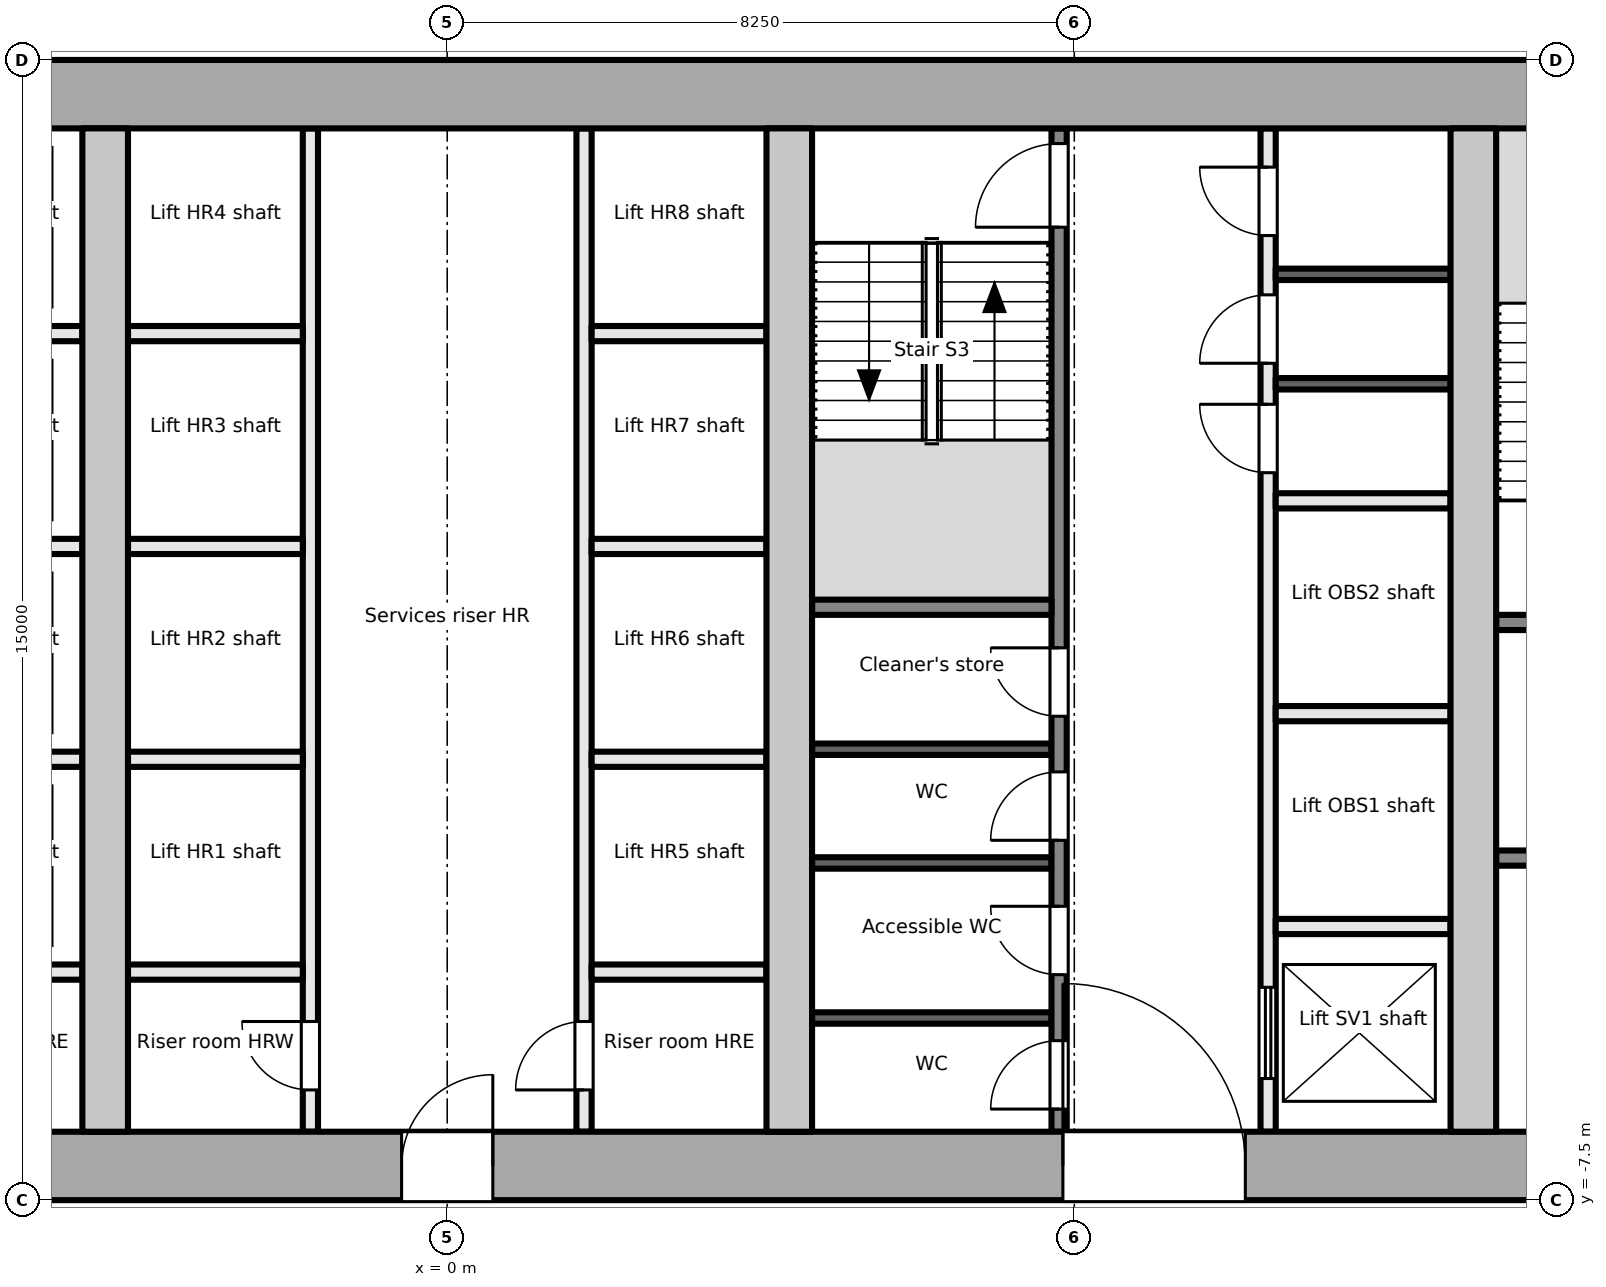
"""IFC4 building model, lengths in metres.
Left out: names, types, materials, properties, quantities, classifications, styles, units other than length and angle.
Written with IfcOpenShell. Run it as: python <this file> out.ifc"""

import sys

from ifc_helpers import new_model, si_unit, direction, frame, frame_2d, origin, place, context, subcontext, project, spatial, rectangle, extrude, element, fill, save


model = new_model("IFC4")
c1 = context("Model", 3, precision=1e-05, world=origin(), true_north=direction((0.0, 1.0)))
c2 = subcontext(c1, "Body", "Model", "MODEL_VIEW")
j1 = project(units=[si_unit("LENGTHUNIT", "METRE"), si_unit("PLANEANGLEUNIT", "RADIAN")], contexts=[c1])
p1 = place(None, origin())
s1 = spatial("IfcSite", under=j1, at=p1, CompositionType="ELEMENT")
p2 = place(p1, origin())
s2 = spatial("IfcBuilding", under=s1, at=p2, CompositionType="ELEMENT")
p3 = place(p2, frame((0.0, 0.0, 91.7)))
s3 = spatial("IfcBuildingStorey", under=s2, at=p3, CompositionType="ELEMENT", Elevation=91.7)
p4 = place(p3, frame((-18.0, -7.05, -0.2), z_axis=(0.0, 0.0, 1.0), x_axis=(1.0, 0.0, 0.0)))
e1 = element("IfcWall", 1, at=p4, inside=s3, PredefinedType="SHEAR", context=c2, shape_type="SweptSolid", body=[
    extrude(rectangle(XDim=36.0, YDim=0.9, at=frame_2d((18.0, 0.0))), origin(), (0.0, 0.0, 1.0), 4.0),
])
p5 = place(p4, frame((7.8, 0.0, 0.2)))
e2 = element("IfcOpeningElement", 2, at=p5, cuts=e1, PredefinedType="OPENING", context=c2, shape_type="SweptSolid", body=[
    extrude(rectangle(XDim=2.4, YDim=2.1, at=frame_2d((1.2, 1.05))), frame((0.0, 0.46, 0.0), z_axis=(0.0, -1.0, 0.0), x_axis=(1.0, 0.0, 0.0)), (0.0, 0.0, 1.0), 0.921),
])
p6 = place(p4, frame((17.4, 0.0, 0.2)))
e3 = element("IfcOpeningElement", 3, at=p6, cuts=e1, PredefinedType="OPENING", context=c2, shape_type="SweptSolid", body=[
    extrude(rectangle(XDim=1.2, YDim=2.1, at=frame_2d((0.6, 1.05))), frame((0.0, 0.46, 0.0), z_axis=(0.0, -1.0, 0.0), x_axis=(1.0, 0.0, 0.0)), (0.0, 0.0, 1.0), 0.921),
])
p7 = place(p4, frame((26.1, 0.0, 0.2)))
e4 = element("IfcOpeningElement", 4, at=p7, cuts=e1, PredefinedType="OPENING", context=c2, shape_type="SweptSolid", body=[
    extrude(rectangle(XDim=2.4, YDim=2.1, at=frame_2d((1.2, 1.05))), frame((0.0, 0.46, 0.0), z_axis=(0.0, -1.0, 0.0), x_axis=(1.0, 0.0, 0.0)), (0.0, 0.0, 1.0), 0.921),
])
p8 = place(p3, frame((-18.0, 7.05, -0.2), z_axis=(0.0, 0.0, 1.0), x_axis=(1.0, 0.0, 0.0)))
e5 = element("IfcWall", 5, at=p8, inside=s3, PredefinedType="SHEAR", context=c2, shape_type="SweptSolid", body=[
    extrude(rectangle(XDim=36.0, YDim=0.9, at=frame_2d((18.0, 0.0))), origin(), (0.0, 0.0, 1.0), 4.0),
])
for number, where, z_axis, x_axis in (
    (6, (-4.5, -6.6, -0.2), (0.0, 0.0, 1.0), (0.0, 1.0, 0.0)),
    (7, (4.5, -6.6, -0.2), (0.0, 0.0, 1.0), (0.0, 1.0, 0.0)),
    (8, (13.5, -6.6, -0.2), (0.0, 0.0, 1.0), (0.0, 1.0, 0.0)),
):
    element("IfcWall", number, at=place(p3, frame(where, z_axis=z_axis, x_axis=x_axis)), inside=s3, PredefinedType="SHEAR", context=c2, shape_type="SweptSolid", body=[
        extrude(rectangle(XDim=13.2, YDim=0.6, at=frame_2d((6.6, 0.0))), origin(), (0.0, 0.0, 1.0), 4.0),
    ])
p9 = place(p3, frame((13.8, -3.0, 0.0), z_axis=(0.0, 0.0, 1.0), x_axis=(1.0, 0.0, 0.0)))
e9 = element("IfcWall", 9, at=p9, inside=s3, PredefinedType="PARTITIONING", context=c2, shape_type="SweptSolid", body=[
    extrude(rectangle(XDim=3.3, YDim=0.2, at=frame_2d((1.65, 0.0))), origin(), (0.0, 0.0, 1.0), 3.8),
])
p10 = place(p9, frame((1.1, 0.0, 0.0)))
e10 = element("IfcOpeningElement", 10, at=p10, cuts=e9, PredefinedType="OPENING", context=c2, shape_type="SweptSolid", body=[
    extrude(rectangle(XDim=1.1, YDim=2.1, at=frame_2d((0.55, 1.05))), frame((0.0, 0.111, 0.0), z_axis=(0.0, -1.0, 0.0), x_axis=(1.0, 0.0, 0.0)), (0.0, 0.0, 1.0), 0.221),
])
p11 = place(p3, frame((13.8, 0.1, 0.0), z_axis=(0.0, 0.0, 1.0), x_axis=(1.0, 0.0, 0.0)))
e11 = element("IfcWall", 11, at=p11, inside=s3, PredefinedType="PARTITIONING", context=c2, shape_type="SweptSolid", body=[
    extrude(rectangle(XDim=3.3, YDim=0.2, at=frame_2d((1.65, 0.0))), origin(), (0.0, 0.0, 1.0), 3.8),
])
p12 = place(p11, frame((1.1, 0.0, 0.0)))
e12 = element("IfcOpeningElement", 12, at=p12, cuts=e11, PredefinedType="OPENING", context=c2, shape_type="SweptSolid", body=[
    extrude(rectangle(XDim=1.1, YDim=2.1, at=frame_2d((0.55, 1.05))), frame((0.0, 0.111, 0.0), z_axis=(0.0, -1.0, 0.0), x_axis=(1.0, 0.0, 0.0)), (0.0, 0.0, 1.0), 0.221),
])
for number, where, z_axis, x_axis in (
    (13, (-7.1, -1.7, 0.0), (0.0, 0.0, 1.0), (1.0, 0.0, 0.0)),
    (14, (-7.1, 1.1, 0.0), (0.0, 0.0, 1.0), (1.0, 0.0, 0.0)),
    (15, (-7.1, 3.9, 0.0), (0.0, 0.0, 1.0), (1.0, 0.0, 0.0)),
    (16, (-7.1, -4.5, 0.0), (0.0, 0.0, 1.0), (1.0, 0.0, 0.0)),
):
    element("IfcWall", number, at=place(p3, frame(where, z_axis=z_axis, x_axis=x_axis)), inside=s3, PredefinedType="PARTITIONING", context=c2, shape_type="SweptSolid", body=[
        extrude(rectangle(XDim=2.3, YDim=0.2, at=frame_2d((1.15, 0.0))), origin(), (0.0, 0.0, 1.0), 3.8),
    ])
p13 = place(p3, frame((-1.8, -6.6, 0.0), z_axis=(0.0, 0.0, 1.0), x_axis=(0.0, 1.0, 0.0)))
e17 = element("IfcWall", 17, at=p13, inside=s3, PredefinedType="PARTITIONING", context=c2, shape_type="SweptSolid", body=[
    extrude(rectangle(XDim=13.2, YDim=0.2, at=frame_2d((6.6, 0.0))), origin(), (0.0, 0.0, 1.0), 3.8),
])
p14 = place(p13, frame((0.55, 0.0, 0.0)))
e18 = element("IfcOpeningElement", 18, at=p14, cuts=e17, PredefinedType="OPENING", context=c2, shape_type="SweptSolid", body=[
    extrude(rectangle(XDim=0.9, YDim=2.1, at=frame_2d((0.45, 1.05))), frame((0.0, 0.111, 0.0), z_axis=(0.0, -1.0, 0.0), x_axis=(1.0, 0.0, 0.0)), (0.0, 0.0, 1.0), 0.221),
])
p15 = place(p3, frame((1.8, -6.6, 0.0), z_axis=(0.0, 0.0, 1.0), x_axis=(0.0, 1.0, 0.0)))
e19 = element("IfcWall", 19, at=p15, inside=s3, PredefinedType="PARTITIONING", context=c2, shape_type="SweptSolid", body=[
    extrude(rectangle(XDim=13.2, YDim=0.2, at=frame_2d((6.6, 0.0))), origin(), (0.0, 0.0, 1.0), 3.8),
])
p16 = place(p15, frame((0.55, 0.0, 0.0)))
e20 = element("IfcOpeningElement", 20, at=p16, cuts=e19, PredefinedType="OPENING", context=c2, shape_type="SweptSolid", body=[
    extrude(rectangle(XDim=0.9, YDim=2.1, at=frame_2d((0.45, 1.05))), frame((0.0, 0.111, 0.0), z_axis=(0.0, -1.0, 0.0), x_axis=(1.0, 0.0, 0.0)), (0.0, 0.0, 1.0), 0.221),
])
for number, where, z_axis, x_axis in (
    (21, (-4.2, -1.7, 0.0), (0.0, 0.0, 1.0), (1.0, 0.0, 0.0)),
    (22, (-4.2, 1.1, 0.0), (0.0, 0.0, 1.0), (1.0, 0.0, 0.0)),
    (23, (-4.2, 3.9, 0.0), (0.0, 0.0, 1.0), (1.0, 0.0, 0.0)),
    (24, (-4.2, -4.5, 0.0), (0.0, 0.0, 1.0), (1.0, 0.0, 0.0)),
    (25, (1.9, -1.7, 0.0), (0.0, 0.0, 1.0), (1.0, 0.0, 0.0)),
    (26, (1.9, 1.1, 0.0), (0.0, 0.0, 1.0), (1.0, 0.0, 0.0)),
    (27, (1.9, 3.9, 0.0), (0.0, 0.0, 1.0), (1.0, 0.0, 0.0)),
    (28, (1.9, -4.5, 0.0), (0.0, 0.0, 1.0), (1.0, 0.0, 0.0)),
):
    element("IfcWall", number, at=place(p3, frame(where, z_axis=z_axis, x_axis=x_axis)), inside=s3, PredefinedType="PARTITIONING", context=c2, shape_type="SweptSolid", body=[
        extrude(rectangle(XDim=2.3, YDim=0.2, at=frame_2d((1.15, 0.0))), origin(), (0.0, 0.0, 1.0), 3.8),
    ])
p17 = place(p3, frame((8.05, -6.6, 0.0), z_axis=(0.0, 0.0, 1.0), x_axis=(0.0, 1.0, 0.0)))
e29 = element("IfcWall", 29, at=p17, inside=s3, PredefinedType="PARTITIONING", context=c2, shape_type="SweptSolid", body=[
    extrude(rectangle(XDim=13.2, YDim=0.2, at=frame_2d((6.6, 0.0))), origin(), (0.0, 0.0, 1.0), 3.8),
])
p18 = place(p17, frame((0.298, 0.0, 0.0)))
e30 = element("IfcOpeningElement", 30, at=p18, cuts=e29, PredefinedType="OPENING", context=c2, shape_type="SweptSolid", body=[
    extrude(rectangle(XDim=0.9, YDim=2.1, at=frame_2d((0.45, 1.05))), frame((0.0, 0.111, 0.0), z_axis=(0.0, -1.0, 0.0), x_axis=(1.0, 0.0, 0.0)), (0.0, 0.0, 1.0), 0.221),
])
p19 = place(p17, frame((2.066, 0.0, 0.0)))
e31 = element("IfcOpeningElement", 31, at=p19, cuts=e29, PredefinedType="OPENING", context=c2, shape_type="SweptSolid", body=[
    extrude(rectangle(XDim=0.9, YDim=2.1, at=frame_2d((0.45, 1.05))), frame((0.0, 0.111, 0.0), z_axis=(0.0, -1.0, 0.0), x_axis=(1.0, 0.0, 0.0)), (0.0, 0.0, 1.0), 0.221),
])
p20 = place(p17, frame((3.834, 0.0, 0.0)))
e32 = element("IfcOpeningElement", 32, at=p20, cuts=e29, PredefinedType="OPENING", context=c2, shape_type="SweptSolid", body=[
    extrude(rectangle(XDim=0.9, YDim=2.1, at=frame_2d((0.45, 1.05))), frame((0.0, 0.111, 0.0), z_axis=(0.0, -1.0, 0.0), x_axis=(1.0, 0.0, 0.0)), (0.0, 0.0, 1.0), 0.221),
])
p21 = place(p17, frame((5.466, 0.0, 0.0)))
e33 = element("IfcOpeningElement", 33, at=p21, cuts=e29, PredefinedType="OPENING", context=c2, shape_type="SweptSolid", body=[
    extrude(rectangle(XDim=0.9, YDim=2.1, at=frame_2d((0.45, 1.05))), frame((0.0, 0.111, 0.0), z_axis=(0.0, -1.0, 0.0), x_axis=(1.0, 0.0, 0.0)), (0.0, 0.0, 1.0), 0.221),
])
p22 = place(p17, frame((11.9, 0.0, 0.0)))
e34 = element("IfcOpeningElement", 34, at=p22, cuts=e29, PredefinedType="OPENING", context=c2, shape_type="SweptSolid", body=[
    extrude(rectangle(XDim=1.1, YDim=2.1, at=frame_2d((0.55, 1.05))), frame((0.0, 0.111, 0.0), z_axis=(0.0, -1.0, 0.0), x_axis=(1.0, 0.0, 0.0)), (0.0, 0.0, 1.0), 0.221),
])
p23 = place(p3, frame((10.8, -6.6, 0.0), z_axis=(0.0, 0.0, 1.0), x_axis=(0.0, 1.0, 0.0)))
e35 = element("IfcWall", 35, at=p23, inside=s3, PredefinedType="PARTITIONING", context=c2, shape_type="SweptSolid", body=[
    extrude(rectangle(XDim=13.2, YDim=0.2, at=frame_2d((6.6, 0.0))), origin(), (0.0, 0.0, 1.0), 3.8),
])
p24 = place(p23, frame((0.7, 0.0, 0.0)))
e36 = element("IfcOpeningElement", 36, at=p24, cuts=e35, PredefinedType="OPENING", context=c2, shape_type="SweptSolid", body=[
    extrude(rectangle(XDim=1.2, YDim=2.1, at=frame_2d((0.6, 1.05))), frame((0.0, 0.111, 0.0), z_axis=(0.0, -1.0, 0.0), x_axis=(1.0, 0.0, 0.0)), (0.0, 0.0, 1.0), 0.221),
])
p25 = place(p23, frame((8.67, 0.0, 0.0)))
e37 = element("IfcOpeningElement", 37, at=p25, cuts=e35, PredefinedType="OPENING", context=c2, shape_type="SweptSolid", body=[
    extrude(rectangle(XDim=0.9, YDim=2.1, at=frame_2d((0.45, 1.05))), frame((0.0, 0.111, 0.0), z_axis=(0.0, -1.0, 0.0), x_axis=(1.0, 0.0, 0.0)), (0.0, 0.0, 1.0), 0.221),
])
p26 = place(p23, frame((10.11, 0.0, 0.0)))
e38 = element("IfcOpeningElement", 38, at=p26, cuts=e35, PredefinedType="OPENING", context=c2, shape_type="SweptSolid", body=[
    extrude(rectangle(XDim=0.9, YDim=2.1, at=frame_2d((0.45, 1.05))), frame((0.0, 0.111, 0.0), z_axis=(0.0, -1.0, 0.0), x_axis=(1.0, 0.0, 0.0)), (0.0, 0.0, 1.0), 0.221),
])
p27 = place(p23, frame((11.79, 0.0, 0.0)))
e39 = element("IfcOpeningElement", 39, at=p27, cuts=e35, PredefinedType="OPENING", context=c2, shape_type="SweptSolid", body=[
    extrude(rectangle(XDim=0.9, YDim=2.1, at=frame_2d((0.45, 1.05))), frame((0.0, 0.111, 0.0), z_axis=(0.0, -1.0, 0.0), x_axis=(1.0, 0.0, 0.0)), (0.0, 0.0, 1.0), 0.221),
])
p28 = place(p3, frame((4.8, 0.3, 0.0), z_axis=(0.0, 0.0, 1.0), x_axis=(1.0, 0.0, 0.0)))
e40 = element("IfcWall", 40, at=p28, inside=s3, PredefinedType="PARTITIONING", context=c2, shape_type="SweptSolid", body=[
    extrude(rectangle(XDim=3.15, YDim=0.2, at=frame_2d((1.575, 0.0))), origin(), (0.0, 0.0, 1.0), 3.8),
])
for number, where, z_axis, x_axis in (
    (41, (4.8, -5.104, 0.0), (0.0, 0.0, 1.0), (1.0, 0.0, 0.0)),
    (42, (4.8, -3.064, 0.0), (0.0, 0.0, 1.0), (1.0, 0.0, 0.0)),
    (43, (4.8, -1.568, 0.0), (0.0, 0.0, 1.0), (1.0, 0.0, 0.0)),
):
    element("IfcWall", number, at=place(p3, frame(where, z_axis=z_axis, x_axis=x_axis)), inside=s3, PredefinedType="PARTITIONING", context=c2, shape_type="SweptSolid", body=[
        extrude(rectangle(XDim=3.15, YDim=0.15, at=frame_2d((1.575, 0.0))), origin(), (0.0, 0.0, 1.0), 3.8),
    ])
for number, where, z_axis, x_axis in (
    (44, (10.9, -3.9, 0.0), (0.0, 0.0, 1.0), (1.0, 0.0, 0.0)),
    (45, (10.9, -1.1, 0.0), (0.0, 0.0, 1.0), (1.0, 0.0, 0.0)),
    (46, (10.9, 1.7, 0.0), (0.0, 0.0, 1.0), (1.0, 0.0, 0.0)),
):
    element("IfcWall", number, at=place(p3, frame(where, z_axis=z_axis, x_axis=x_axis)), inside=s3, PredefinedType="PARTITIONING", context=c2, shape_type="SweptSolid", body=[
        extrude(rectangle(XDim=2.3, YDim=0.2, at=frame_2d((1.15, 0.0))), origin(), (0.0, 0.0, 1.0), 3.8),
    ])
for number, where, z_axis, x_axis in (
    (47, (10.9, 3.24, 0.0), (0.0, 0.0, 1.0), (1.0, 0.0, 0.0)),
    (48, (10.9, 4.68, 0.0), (0.0, 0.0, 1.0), (1.0, 0.0, 0.0)),
):
    element("IfcWall", number, at=place(p3, frame(where, z_axis=z_axis, x_axis=x_axis)), inside=s3, PredefinedType="PARTITIONING", context=c2, shape_type="SweptSolid", body=[
        extrude(rectangle(XDim=2.3, YDim=0.15, at=frame_2d((1.15, 0.0))), origin(), (0.0, 0.0, 1.0), 3.8),
    ])
p29 = place(p14, origin())
e49 = element("IfcDoor", 49, at=p29, inside=s3, OperationType="SINGLE_SWING_RIGHT", PredefinedType="DOOR", context=c2, shape_type="SweptSolid", body=[
    extrude(rectangle(XDim=0.9, YDim=2.1, at=frame_2d((0.45, 1.05))), frame((0.0, 0.025, 0.0), z_axis=(0.0, -1.0, 0.0), x_axis=(1.0, 0.0, 0.0)), (0.0, 0.0, 1.0), 0.05),
])
fill(e18, e49)
p30 = place(p16, origin())
e50 = element("IfcDoor", 50, at=p30, inside=s3, OperationType="SINGLE_SWING_LEFT", PredefinedType="DOOR", context=c2, shape_type="SweptSolid", body=[
    extrude(rectangle(XDim=0.9, YDim=2.1, at=frame_2d((0.45, 1.05))), frame((0.0, 0.025, 0.0), z_axis=(0.0, -1.0, 0.0), x_axis=(1.0, 0.0, 0.0)), (0.0, 0.0, 1.0), 0.05),
])
fill(e20, e50)
p31 = place(p6, origin())
e51 = element("IfcDoor", 51, at=p31, inside=s3, OperationType="SINGLE_SWING_RIGHT", PredefinedType="DOOR", context=c2, shape_type="SweptSolid", body=[
    extrude(rectangle(XDim=1.2, YDim=2.1, at=frame_2d((0.6, 1.05))), frame((0.0, 0.025, 0.0), z_axis=(0.0, -1.0, 0.0), x_axis=(1.0, 0.0, 0.0)), (0.0, 0.0, 1.0), 0.05),
])
fill(e3, e51)
p32 = place(p18, origin())
e52 = element("IfcDoor", 52, at=p32, inside=s3, OperationType="SINGLE_SWING_LEFT", PredefinedType="DOOR", context=c2, shape_type="SweptSolid", body=[
    extrude(rectangle(XDim=0.9, YDim=2.1, at=frame_2d((0.45, 1.05))), frame((0.0, 0.025, 0.0), z_axis=(0.0, -1.0, 0.0), x_axis=(1.0, 0.0, 0.0)), (0.0, 0.0, 1.0), 0.05),
])
fill(e30, e52)
p33 = place(p19, origin())
e53 = element("IfcDoor", 53, at=p33, inside=s3, OperationType="SINGLE_SWING_RIGHT", PredefinedType="DOOR", context=c2, shape_type="SweptSolid", body=[
    extrude(rectangle(XDim=0.9, YDim=2.1, at=frame_2d((0.45, 1.05))), frame((0.0, 0.025, 0.0), z_axis=(0.0, -1.0, 0.0), x_axis=(1.0, 0.0, 0.0)), (0.0, 0.0, 1.0), 0.05),
])
fill(e31, e53)
p34 = place(p20, origin())
e54 = element("IfcDoor", 54, at=p34, inside=s3, OperationType="SINGLE_SWING_LEFT", PredefinedType="DOOR", context=c2, shape_type="SweptSolid", body=[
    extrude(rectangle(XDim=0.9, YDim=2.1, at=frame_2d((0.45, 1.05))), frame((0.0, 0.025, 0.0), z_axis=(0.0, -1.0, 0.0), x_axis=(1.0, 0.0, 0.0)), (0.0, 0.0, 1.0), 0.05),
])
fill(e32, e54)
p35 = place(p21, origin())
e55 = element("IfcDoor", 55, at=p35, inside=s3, OperationType="SINGLE_SWING_RIGHT", PredefinedType="DOOR", context=c2, shape_type="SweptSolid", body=[
    extrude(rectangle(XDim=0.9, YDim=2.1, at=frame_2d((0.45, 1.05))), frame((0.0, 0.025, 0.0), z_axis=(0.0, -1.0, 0.0), x_axis=(1.0, 0.0, 0.0)), (0.0, 0.0, 1.0), 0.05),
])
fill(e33, e55)
p36 = place(p22, origin())
e56 = element("IfcDoor", 56, at=p36, inside=s3, OperationType="SINGLE_SWING_LEFT", PredefinedType="DOOR", context=c2, shape_type="SweptSolid", body=[
    extrude(rectangle(XDim=1.1, YDim=2.1, at=frame_2d((0.55, 1.05))), frame((0.0, 0.025, 0.0), z_axis=(0.0, -1.0, 0.0), x_axis=(1.0, 0.0, 0.0)), (0.0, 0.0, 1.0), 0.05),
])
fill(e34, e56)
p37 = place(p7, origin())
e57 = element("IfcDoor", 57, at=p37, inside=s3, OperationType="DOUBLE_DOOR_DOUBLE_SWING", PredefinedType="DOOR", context=c2, shape_type="SweptSolid", body=[
    extrude(rectangle(XDim=2.4, YDim=2.1, at=frame_2d((1.2, 1.05))), frame((0.0, 0.025, 0.0), z_axis=(0.0, -1.0, 0.0), x_axis=(1.0, 0.0, 0.0)), (0.0, 0.0, 1.0), 0.05),
])
fill(e4, e57)
p38 = place(p24, origin())
e58 = element("IfcDoor", 58, at=p38, inside=s3, OperationType="DOUBLE_DOOR_SLIDING", PredefinedType="DOOR", context=c2, shape_type="SweptSolid", body=[
    extrude(rectangle(XDim=1.2, YDim=2.1, at=frame_2d((0.6, 1.05))), frame((0.0, 0.025, 0.0), z_axis=(0.0, -1.0, 0.0), x_axis=(1.0, 0.0, 0.0)), (0.0, 0.0, 1.0), 0.05),
])
fill(e36, e58)
p39 = place(p25, origin())
e59 = element("IfcDoor", 59, at=p39, inside=s3, OperationType="SINGLE_SWING_RIGHT", PredefinedType="DOOR", context=c2, shape_type="SweptSolid", body=[
    extrude(rectangle(XDim=0.9, YDim=2.1, at=frame_2d((0.45, 1.05))), frame((0.0, 0.025, 0.0), z_axis=(0.0, -1.0, 0.0), x_axis=(1.0, 0.0, 0.0)), (0.0, 0.0, 1.0), 0.05),
])
fill(e37, e59)
p40 = place(p26, origin())
e60 = element("IfcDoor", 60, at=p40, inside=s3, OperationType="SINGLE_SWING_LEFT", PredefinedType="DOOR", context=c2, shape_type="SweptSolid", body=[
    extrude(rectangle(XDim=0.9, YDim=2.1, at=frame_2d((0.45, 1.05))), frame((0.0, 0.025, 0.0), z_axis=(0.0, -1.0, 0.0), x_axis=(1.0, 0.0, 0.0)), (0.0, 0.0, 1.0), 0.05),
])
fill(e38, e60)
p41 = place(p27, origin())
e61 = element("IfcDoor", 61, at=p41, inside=s3, OperationType="SINGLE_SWING_RIGHT", PredefinedType="DOOR", context=c2, shape_type="SweptSolid", body=[
    extrude(rectangle(XDim=0.9, YDim=2.1, at=frame_2d((0.45, 1.05))), frame((0.0, 0.025, 0.0), z_axis=(0.0, -1.0, 0.0), x_axis=(1.0, 0.0, 0.0)), (0.0, 0.0, 1.0), 0.05),
])
fill(e39, e61)
save(model, sys.argv[1])
